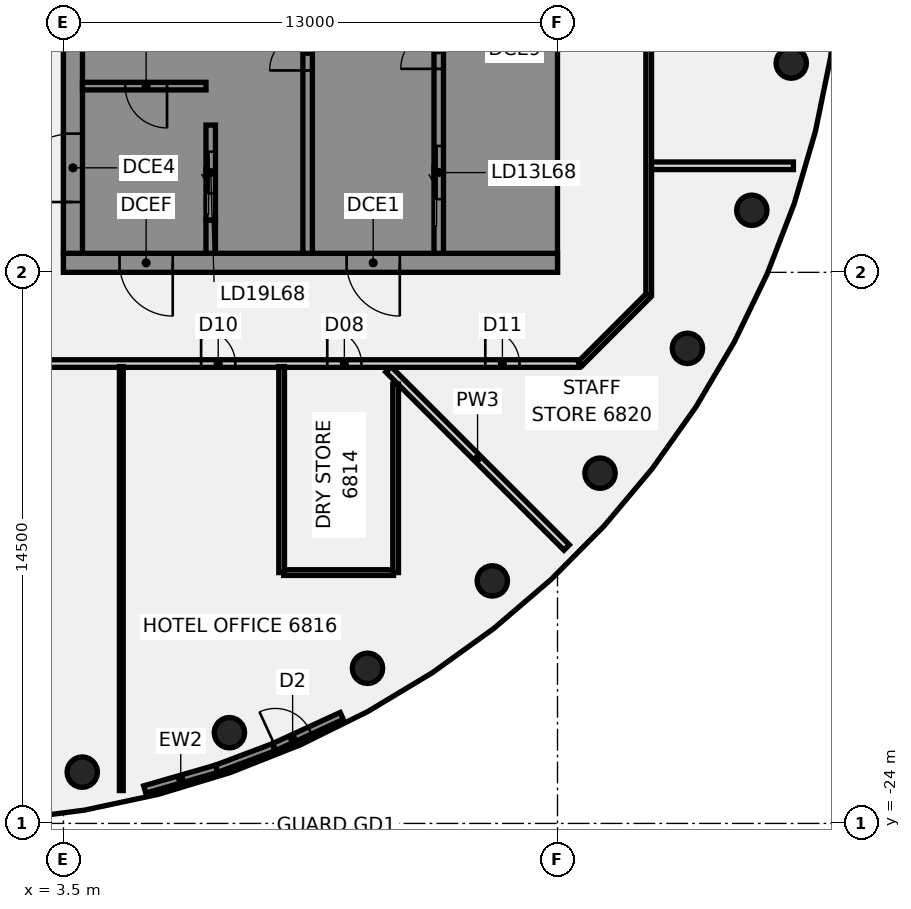
"""IFC4 building model, lengths in metres.
Left out: names, types, materials, properties, quantities, classifications, styles, units other than length and angle.
Written with IfcOpenShell. Run it as: python <this file> out.ifc"""

import sys

from ifc_helpers import new_model, si_unit, direction, frame, frame_2d, origin, origin_2d, place, context, subcontext, project, spatial, polyline, rectangle, circle, outline, extrude, element, fill, save


model = new_model("IFC4")
c1 = context("Model", 3, precision=1e-05, world=origin(), true_north=direction((0.0, 1.0)))
c2 = subcontext(c1, "Body", "Model", "MODEL_VIEW")
j1 = project(units=[si_unit("LENGTHUNIT", "METRE"), si_unit("PLANEANGLEUNIT", "RADIAN")], contexts=[c1])
p1 = place(None, origin())
s1 = spatial("IfcSite", under=j1, at=p1, CompositionType="ELEMENT")
p2 = place(p1, origin())
s2 = spatial("IfcBuilding", under=s1, at=p2, CompositionType="ELEMENT")
p3 = place(p2, frame((0.0, 0.0, 267.6)))
s3 = spatial("IfcBuildingStorey", under=s2, at=p3, CompositionType="ELEMENT", Elevation=267.6)
for number, where, z_axis, x_axis in (
    (1, (3.994, -22.651, -0.14), (0.0, 0.0, 1.0), (1.0, 0.0, 0.0)),
    (2, (7.866, -21.613, -0.14), (0.0, 0.0, 1.0), (1.0, 0.0, 0.0)),
    (3, (11.5, -19.919, -0.14), (0.0, 0.0, 1.0), (1.0, 0.0, 0.0)),
    (4, (14.784, -17.619, -0.14), (0.0, 0.0, 1.0), (1.0, 0.0, 0.0)),
    (5, (17.619, -14.784, -0.14), (0.0, 0.0, 1.0), (1.0, 0.0, 0.0)),
    (6, (19.919, -11.5, -0.14), (0.0, 0.0, 1.0), (1.0, 0.0, 0.0)),
    (7, (21.613, -7.866, -0.14), (0.0, 0.0, 1.0), (1.0, 0.0, 0.0)),
    (8, (22.651, -3.994, -0.14), (0.0, 0.0, 1.0), (1.0, 0.0, 0.0)),
):
    element("IfcColumn", number, at=place(p3, frame(where, z_axis=z_axis, x_axis=x_axis)), inside=s3, PredefinedType="COLUMN", context=c2, shape_type="SweptSolid", body=[
        extrude(circle(Radius=0.4, at=origin_2d()), origin(), (0.0, 0.0, 1.0), 3.6),
    ])
p4 = place(p3, frame((12.052, -12.052, 0.0), z_axis=(0.0, 0.0, 1.0), x_axis=(0.707106781187, -0.707106781187, 0.0)))
e9 = element("IfcWall", 9, at=p4, inside=s3, PredefinedType="PARTITIONING", context=c2, shape_type="SweptSolid", body=[
    extrude(rectangle(XDim=6.631, YDim=0.2, at=frame_2d((3.315, 0.0))), origin(), (0.0, 0.0, 1.0), 2.864),
])
p5 = place(p3, frame((-17.1, -11.9, 0.0), z_axis=(0.0, 0.0, 1.0), x_axis=(1.0, 0.0, 0.0)))
e10 = element("IfcWall", 10, at=p5, inside=s3, PredefinedType="PARTITIONING", context=c2, shape_type="SweptSolid", body=[
    extrude(rectangle(XDim=34.165, YDim=0.2, at=frame_2d((17.083, 0.0))), origin(), (0.0, 0.0, 1.0), 2.864),
])
p6 = place(p5, frame((7.75, 0.0, 0.0)))
e11 = element("IfcOpeningElement", 11, at=p6, cuts=e10, PredefinedType="OPENING", context=c2, shape_type="SweptSolid", body=[
    extrude(rectangle(XDim=0.9, YDim=2.1, at=frame_2d((0.45, 1.05))), frame((0.0, 0.11, 0.0), z_axis=(0.0, -1.0, 0.0), x_axis=(1.0, 0.0, 0.0)), (0.0, 0.0, 1.0), 0.22),
])
p7 = place(p5, frame((27.541, 0.0, 0.0)))
e12 = element("IfcOpeningElement", 12, at=p7, cuts=e10, PredefinedType="OPENING", context=c2, shape_type="SweptSolid", body=[
    extrude(rectangle(XDim=0.9, YDim=2.1, at=frame_2d((0.45, 1.05))), frame((0.0, 0.11, 0.0), z_axis=(0.0, -1.0, 0.0), x_axis=(1.0, 0.0, 0.0)), (0.0, 0.0, 1.0), 0.22),
])
p8 = place(p5, frame((16.809, 0.0, 0.0)))
e13 = element("IfcOpeningElement", 13, at=p8, cuts=e10, PredefinedType="OPENING", context=c2, shape_type="SweptSolid", body=[
    extrude(rectangle(XDim=1.8, YDim=2.1, at=frame_2d((0.9, 1.05))), frame((0.0, 0.11, 0.0), z_axis=(0.0, -1.0, 0.0), x_axis=(1.0, 0.0, 0.0)), (0.0, 0.0, 1.0), 0.22),
])
p9 = place(p5, frame((24.222, 0.0, 0.0)))
e14 = element("IfcOpeningElement", 14, at=p9, cuts=e10, PredefinedType="OPENING", context=c2, shape_type="SweptSolid", body=[
    extrude(rectangle(XDim=0.9, YDim=2.1, at=frame_2d((0.45, 1.05))), frame((0.0, 0.11, 0.0), z_axis=(0.0, -1.0, 0.0), x_axis=(1.0, 0.0, 0.0)), (0.0, 0.0, 1.0), 0.22),
])
p10 = place(p5, frame((31.7, 0.0, 0.0)))
e15 = element("IfcOpeningElement", 15, at=p10, cuts=e10, PredefinedType="OPENING", context=c2, shape_type="SweptSolid", body=[
    extrude(rectangle(XDim=0.9, YDim=2.1, at=frame_2d((0.45, 1.05))), frame((0.0, 0.11, 0.0), z_axis=(0.0, -1.0, 0.0), x_axis=(1.0, 0.0, 0.0)), (0.0, 0.0, 1.0), 0.22),
])
p11 = place(p3, frame((9.296, -17.4, 0.0), z_axis=(0.0, 0.0, 1.0), x_axis=(1.0, 0.0, 0.0)))
e16 = element("IfcWall", 16, at=p11, inside=s3, PredefinedType="PARTITIONING", context=c2, shape_type="SweptSolid", body=[
    extrude(rectangle(XDim=2.89, YDim=0.15, at=frame_2d((1.445, 0.0))), origin(), (0.0, 0.0, 1.0), 2.864),
])
p12 = place(p3, frame((18.955, -6.696, 0.0), z_axis=(0.0, 0.0, 1.0), x_axis=(1.0, 0.0, 0.0)))
e17 = element("IfcWall", 17, at=p12, inside=s3, PredefinedType="PARTITIONING", context=c2, shape_type="SweptSolid", body=[
    extrude(rectangle(XDim=3.753, YDim=0.2, at=frame_2d((1.876, 0.0))), origin(), (0.0, 0.0, 1.0), 2.864),
])
p13 = place(p3, frame((17.1, -11.9, 0.0), z_axis=(0.0, 0.0, 1.0), x_axis=(0.707106781187, 0.707106781187, 0.0)))
e18 = element("IfcWall", 18, at=p13, inside=s3, PredefinedType="PARTITIONING", context=c2, shape_type="SweptSolid", body=[
    extrude(rectangle(XDim=2.505, YDim=0.15, at=frame_2d((1.253, 0.0))), origin(), (0.0, 0.0, 1.0), 2.864),
])
p14 = place(p3, frame((5.022, -23.136, 0.0), z_axis=(0.0, 0.0, 1.0), x_axis=(0.0, 1.0, 0.0)))
e19 = element("IfcWall", 19, at=p14, inside=s3, PredefinedType="PARTITIONING", context=c2, shape_type="SweptSolid", body=[
    extrude(rectangle(XDim=11.156, YDim=0.1, at=frame_2d((5.578, 0.0))), origin(), (0.0, 0.0, 1.0), 2.864),
])
p15 = place(p3, frame((9.241, -17.4, 0.0), z_axis=(0.0, 0.0, 1.0), x_axis=(0.0, 1.0, 0.0)))
e20 = element("IfcWall", 20, at=p15, inside=s3, PredefinedType="PARTITIONING", context=c2, shape_type="SweptSolid", body=[
    extrude(rectangle(XDim=5.42, YDim=0.15, at=frame_2d((2.71, 0.0))), origin(), (0.0, 0.0, 1.0), 2.864),
])
p16 = place(p3, frame((12.241, -17.4, 0.0), z_axis=(0.0, 0.0, 1.0), x_axis=(0.0, 1.0, 0.0)))
e21 = element("IfcWall", 21, at=p16, inside=s3, PredefinedType="PARTITIONING", context=c2, shape_type="SweptSolid", body=[
    extrude(rectangle(XDim=4.959, YDim=0.15, at=frame_2d((2.479, 0.0))), origin(), (0.0, 0.0, 1.0), 2.864),
])
p17 = place(p3, frame((18.9, -10.1, 0.0), z_axis=(0.0, 0.0, 1.0), x_axis=(0.0, 1.0, 0.0)))
e22 = element("IfcWall", 22, at=p17, inside=s3, PredefinedType="PARTITIONING", context=c2, shape_type="SweptSolid", body=[
    extrude(rectangle(XDim=20.2, YDim=0.15, at=frame_2d((10.1, 0.0))), origin(), (0.0, 0.0, 1.0), 2.864),
])
p18 = place(p17, frame((7.154, 0.0, 0.0)))
e23 = element("IfcOpeningElement", 23, at=p18, cuts=e22, PredefinedType="OPENING", context=c2, shape_type="SweptSolid", body=[
    extrude(rectangle(XDim=0.9, YDim=2.1, at=frame_2d((0.45, 1.05))), frame((0.0, 0.085, 0.0), z_axis=(0.0, -1.0, 0.0), x_axis=(1.0, 0.0, 0.0)), (0.0, 0.0, 1.0), 0.17),
])
p19 = place(p3, frame((5.638, -23.107, 0.0), z_axis=(0.0, 0.0, 1.0), x_axis=(0.960848925483, 0.277072810644, 0.0)))
e24 = element("IfcWall", 24, at=p19, inside=s3, PredefinedType="SOLIDWALL", context=c2, shape_type="SweptSolid", body=[
    extrude(rectangle(XDim=1.974, YDim=0.2, at=frame_2d((0.987, 0.0))), origin(), (0.0, 0.0, 1.0), 3.46),
])
p20 = place(p3, frame((9.031, -21.996, 0.0), z_axis=(0.0, 0.0, 1.0), x_axis=(0.90857405357, 0.417723819263, 0.0)))
e25 = element("IfcWall", 25, at=p20, inside=s3, PredefinedType="SOLIDWALL", context=c2, shape_type="SweptSolid", body=[
    extrude(rectangle(XDim=1.973, YDim=0.2, at=frame_2d((0.987, 0.0))), origin(), (0.0, 0.0, 1.0), 3.46),
])
p21 = place(p20, frame((0.05, 0.0, 0.0)))
e26 = element("IfcOpeningElement", 26, at=p21, cuts=e25, PredefinedType="OPENING", context=c2, shape_type="SweptSolid", body=[
    extrude(rectangle(XDim=1.0, YDim=2.4, at=frame_2d((0.5, 1.2))), frame((0.0, 0.11, 0.0), z_axis=(0.0, -1.0, 0.0), x_axis=(1.0, 0.0, 0.0)), (0.0, 0.0, 1.0), 0.22),
])
p22 = place(p3, frame((7.534, -22.56, 0.0), z_axis=(0.0, 0.0, 1.0), x_axis=(0.935643575704, 0.352946312127, 0.0)))
e27 = element("IfcWall", 27, at=p22, inside=s3, PredefinedType="SOLIDWALL", context=c2, shape_type="SweptSolid", body=[
    extrude(rectangle(XDim=1.599, YDim=0.2, at=frame_2d((0.8, 0.0))), origin(), (0.0, 0.0, 1.0), 3.46),
])
p23 = place(p3, frame((16.5, -9.25, 0.0), z_axis=(0.0, 0.0, 1.0), x_axis=(-1.0, 0.0, 0.0)))
e28 = element("IfcWall", 28, at=p23, inside=s3, PredefinedType="SHEAR", context=c2, shape_type="SweptSolid", body=[
    extrude(rectangle(XDim=13.0, YDim=0.5, at=frame_2d((6.5, 0.0))), origin(), (0.0, 0.0, 1.0), 3.46),
])
p24 = place(p23, frame((4.15, 0.0, 0.0)))
e29 = element("IfcOpeningElement", 29, at=p24, cuts=e28, PredefinedType="OPENING", context=c2, shape_type="SweptSolid", body=[
    extrude(rectangle(XDim=1.4, YDim=2.1, at=frame_2d((0.7, 1.05))), frame((0.0, 0.26, 0.0), z_axis=(0.0, -1.0, 0.0), x_axis=(1.0, 0.0, 0.0)), (0.0, 0.0, 1.0), 0.52),
])
p25 = place(p23, frame((10.125, 0.0, 0.0)))
e30 = element("IfcOpeningElement", 30, at=p25, cuts=e28, PredefinedType="OPENING", context=c2, shape_type="SweptSolid", body=[
    extrude(rectangle(XDim=1.4, YDim=2.1, at=frame_2d((0.7, 1.05))), frame((0.0, 0.26, 0.0), z_axis=(0.0, -1.0, 0.0), x_axis=(1.0, 0.0, 0.0)), (0.0, 0.0, 1.0), 0.52),
])
p26 = place(p3, origin())
e31 = element("IfcWall", 31, at=p26, inside=s3, PredefinedType="SHEAR", context=c2, shape_type="SweptSolid", body=[
    extrude(outline(polyline([(13.5, -8.125), (13.5, -9.0), (16.0, -9.0), (16.5, -9.0), (16.5, 9.0), (16.0, 9.0), (13.5, 9.0), (13.5, 8.125), (16.0, 8.125), (16.0, 5.625), (13.5, 5.625), (13.5, 5.375), (16.0, 5.375), (16.0, -5.375), (13.5, -5.375), (13.5, -5.625), (16.0, -5.625), (16.0, -8.125), (13.5, -8.125)])), origin(), (0.0, 0.0, 1.0), 3.46),
])
p27 = place(p3, origin())
e32 = element("IfcWall", 32, at=p27, inside=s3, PredefinedType="SHEAR", context=c2, shape_type="SweptSolid", body=[
    extrude(outline(polyline([(9.8, -5.375), (7.5, -5.375), (7.5, 2.625), (9.8, 2.625), (9.8, 2.875), (7.5, 2.875), (7.5, 5.375), (9.8, 5.375), (9.8, 5.625), (7.5, 5.625), (7.5, 8.125), (9.8, 8.125), (9.8, 9.0), (7.5, 9.0), (7.25, 9.0), (7.25, -5.625), (7.5, -5.625), (9.8, -5.625), (9.8, -5.375)])), origin(), (0.0, 0.0, 1.0), 3.46),
])
p28 = place(p3, origin())
e33 = element("IfcWall", 33, at=p28, inside=s3, PredefinedType="SHEAR", context=c2, shape_type="SweptSolid", body=[
    extrude(outline(polyline([(7.5, -8.125), (7.5, -9.0), (9.8, -9.0), (9.8, -8.125), (9.8, -5.625), (9.55, -5.625), (9.55, -8.125), (7.5, -8.125)])), origin(), (0.0, 0.0, 1.0), 3.46),
])
p29 = place(p3, frame((7.375, -9.0, 0.0), z_axis=(0.0, 0.0, 1.0), x_axis=(0.0, 1.0, 0.0)))
e34 = element("IfcWall", 34, at=p29, inside=s3, PredefinedType="SHEAR", context=c2, shape_type="SweptSolid", body=[
    extrude(rectangle(XDim=0.875, YDim=0.25, at=frame_2d((0.438, 0.0))), origin(), (0.0, 0.0, 1.0), 3.46),
])
p30 = place(p3, frame((13.375, -9.0, 0.0), z_axis=(0.0, 0.0, 1.0), x_axis=(0.0, 1.0, 0.0)))
e35 = element("IfcWall", 35, at=p30, inside=s3, PredefinedType="SHEAR", context=c2, shape_type="SweptSolid", body=[
    extrude(rectangle(XDim=18.0, YDim=0.25, at=frame_2d((9.0, 0.0))), origin(), (0.0, 0.0, 1.0), 3.46),
])
p31 = place(p30, frame((1.425, 0.0, 0.0)))
e36 = element("IfcOpeningElement", 36, at=p31, cuts=e35, PredefinedType="OPENING", context=c2, shape_type="SweptSolid", body=[
    extrude(rectangle(XDim=1.4, YDim=2.1, at=frame_2d((0.7, 1.05))), frame((0.0, 0.135, 0.0), z_axis=(0.0, -1.0, 0.0), x_axis=(1.0, 0.0, 0.0)), (0.0, 0.0, 1.0), 0.27),
])
p32 = place(p30, frame((4.854, 0.0, 0.0)))
e37 = element("IfcOpeningElement", 37, at=p32, cuts=e35, PredefinedType="OPENING", context=c2, shape_type="SweptSolid", body=[
    extrude(rectangle(XDim=1.0, YDim=2.1, at=frame_2d((0.5, 1.05))), frame((0.0, 0.135, 0.0), z_axis=(0.0, -1.0, 0.0), x_axis=(1.0, 0.0, 0.0)), (0.0, 0.0, 1.0), 0.27),
])
p33 = place(p30, frame((10.354, 0.0, 0.0)))
e38 = element("IfcOpeningElement", 38, at=p33, cuts=e35, PredefinedType="OPENING", context=c2, shape_type="SweptSolid", body=[
    extrude(rectangle(XDim=1.0, YDim=2.1, at=frame_2d((0.5, 1.05))), frame((0.0, 0.135, 0.0), z_axis=(0.0, -1.0, 0.0), x_axis=(1.0, 0.0, 0.0)), (0.0, 0.0, 1.0), 0.27),
])
p34 = place(p3, frame((9.925, -9.0, 0.0), z_axis=(0.0, 0.0, 1.0), x_axis=(0.0, 1.0, 0.0)))
e39 = element("IfcWall", 39, at=p34, inside=s3, PredefinedType="SHEAR", context=c2, shape_type="SweptSolid", body=[
    extrude(rectangle(XDim=18.0, YDim=0.25, at=frame_2d((9.0, 0.0))), origin(), (0.0, 0.0, 1.0), 3.46),
])
p35 = place(p34, frame((12.575, 0.0, 0.0)))
e40 = element("IfcOpeningElement", 40, at=p35, cuts=e39, PredefinedType="OPENING", context=c2, shape_type="SweptSolid", body=[
    extrude(rectangle(XDim=1.1, YDim=2.1, at=frame_2d((0.55, 1.05))), frame((0.0, 0.135, 0.0), z_axis=(0.0, -1.0, 0.0), x_axis=(1.0, 0.0, 0.0)), (0.0, 0.0, 1.0), 0.27),
])
p36 = place(p34, frame((15.325, 0.0, 0.0)))
e41 = element("IfcOpeningElement", 41, at=p36, cuts=e39, PredefinedType="OPENING", context=c2, shape_type="SweptSolid", body=[
    extrude(rectangle(XDim=1.1, YDim=2.1, at=frame_2d((0.55, 1.05))), frame((0.0, 0.135, 0.0), z_axis=(0.0, -1.0, 0.0), x_axis=(1.0, 0.0, 0.0)), (0.0, 0.0, 1.0), 0.27),
])
p37 = place(p34, frame((4.812, 0.0, 0.0)))
e42 = element("IfcOpeningElement", 42, at=p37, cuts=e39, PredefinedType="OPENING", context=c2, shape_type="SweptSolid", body=[
    extrude(rectangle(XDim=1.0, YDim=2.1, at=frame_2d((0.5, 1.05))), frame((0.0, 0.135, 0.0), z_axis=(0.0, -1.0, 0.0), x_axis=(1.0, 0.0, 0.0)), (0.0, 0.0, 1.0), 0.27),
])
p38 = place(p34, frame((7.562, 0.0, 0.0)))
e43 = element("IfcOpeningElement", 43, at=p38, cuts=e39, PredefinedType="OPENING", context=c2, shape_type="SweptSolid", body=[
    extrude(rectangle(XDim=1.0, YDim=2.1, at=frame_2d((0.5, 1.05))), frame((0.0, 0.135, 0.0), z_axis=(0.0, -1.0, 0.0), x_axis=(1.0, 0.0, 0.0)), (0.0, 0.0, 1.0), 0.27),
])
p39 = place(p34, frame((9.875, 0.0, 0.0)))
e44 = element("IfcOpeningElement", 44, at=p39, cuts=e39, PredefinedType="OPENING", context=c2, shape_type="SweptSolid", body=[
    extrude(rectangle(XDim=1.0, YDim=2.1, at=frame_2d((0.5, 1.05))), frame((0.0, 0.135, 0.0), z_axis=(0.0, -1.0, 0.0), x_axis=(1.0, 0.0, 0.0)), (0.0, 0.0, 1.0), 0.27),
])
p40 = place(p3, frame((7.375, -8.125, 0.0), z_axis=(0.0, 0.0, 1.0), x_axis=(0.0, 1.0, 0.0)))
e45 = element("IfcWall", 45, at=p40, inside=s3, PredefinedType="SHEAR", context=c2, shape_type="SweptSolid", body=[
    extrude(rectangle(XDim=2.5, YDim=0.25, at=frame_2d((1.25, 0.0))), origin(), (0.0, 0.0, 1.0), 3.46),
])
p41 = place(p40, frame((0.7, 0.0, 0.0)))
e46 = element("IfcOpeningElement", 46, at=p41, cuts=e45, PredefinedType="OPENING", context=c2, shape_type="SweptSolid", body=[
    extrude(rectangle(XDim=1.1, YDim=2.1, at=frame_2d((0.55, 1.05))), frame((0.0, 0.135, 0.0), z_axis=(0.0, -1.0, 0.0), x_axis=(1.0, 0.0, 0.0)), (0.0, 0.0, 1.0), 0.27),
])
p42 = place(p3, frame((3.75, -9.0, 0.0), z_axis=(0.0, 0.0, 1.0), x_axis=(0.0, 1.0, 0.0)))
e47 = element("IfcWall", 47, at=p42, inside=s3, PredefinedType="SHEAR", context=c2, shape_type="SweptSolid", body=[
    extrude(rectangle(XDim=18.0, YDim=0.5, at=frame_2d((9.0, 0.0))), origin(), (0.0, 0.0, 1.0), 3.46),
])
p43 = place(p42, frame((1.35, 0.0, 0.0)))
e48 = element("IfcOpeningElement", 48, at=p43, cuts=e47, PredefinedType="OPENING", context=c2, shape_type="SweptSolid", body=[
    extrude(rectangle(XDim=1.8, YDim=2.1, at=frame_2d((0.9, 1.05))), frame((0.0, 0.26, 0.0), z_axis=(0.0, -1.0, 0.0), x_axis=(1.0, 0.0, 0.0)), (0.0, 0.0, 1.0), 0.52),
])
p44 = place(p42, frame((12.75, 0.0, 0.0)))
e49 = element("IfcOpeningElement", 49, at=p44, cuts=e47, PredefinedType="OPENING", context=c2, shape_type="SweptSolid", body=[
    extrude(rectangle(XDim=1.0, YDim=2.1, at=frame_2d((0.5, 1.05))), frame((0.0, 0.26, 0.0), z_axis=(0.0, -1.0, 0.0), x_axis=(1.0, 0.0, 0.0)), (0.0, 0.0, 1.0), 0.52),
])
p45 = place(p42, frame((16.274, 0.0, 0.0)))
e50 = element("IfcOpeningElement", 50, at=p45, cuts=e47, PredefinedType="OPENING", context=c2, shape_type="SweptSolid", body=[
    extrude(rectangle(XDim=1.0, YDim=2.1, at=frame_2d((0.5, 1.05))), frame((0.0, 0.26, 0.0), z_axis=(0.0, -1.0, 0.0), x_axis=(1.0, 0.0, 0.0)), (0.0, 0.0, 1.0), 0.52),
])
p46 = place(p3, frame((7.25, -4.6, 0.0), z_axis=(0.0, 0.0, 1.0), x_axis=(-1.0, 0.0, 0.0)))
e51 = element("IfcWall", 51, at=p46, inside=s3, PredefinedType="SHEAR", context=c2, shape_type="SweptSolid", body=[
    extrude(rectangle(XDim=3.25, YDim=0.2, at=frame_2d((1.625, 0.0))), origin(), (0.0, 0.0, 1.0), 3.46),
])
p47 = place(p46, frame((1.025, 0.0, 0.0)))
e52 = element("IfcOpeningElement", 52, at=p47, cuts=e51, PredefinedType="OPENING", context=c2, shape_type="SweptSolid", body=[
    extrude(rectangle(XDim=1.1, YDim=2.1, at=frame_2d((0.55, 1.05))), frame((0.0, 0.11, 0.0), z_axis=(0.0, -1.0, 0.0), x_axis=(1.0, 0.0, 0.0)), (0.0, 0.0, 1.0), 0.22),
])
p48 = place(p7, frame((0.9, 0.0, 0.0), z_axis=(0.0, 0.0, 1.0), x_axis=(-1.0, 0.0, 0.0)))
e53 = element("IfcDoor", 53, at=p48, inside=s3, OperationType="SINGLE_SWING_RIGHT", PredefinedType="DOOR", context=c2, shape_type="SweptSolid", body=[
    extrude(rectangle(XDim=0.9, YDim=2.1, at=frame_2d((0.45, 1.05))), frame((0.0, 0.025, 0.0), z_axis=(0.0, -1.0, 0.0), x_axis=(1.0, 0.0, 0.0)), (0.0, 0.0, 1.0), 0.05),
])
fill(e12, e53)
p49 = place(p9, frame((0.9, 0.0, 0.0), z_axis=(0.0, 0.0, 1.0), x_axis=(-1.0, 0.0, 0.0)))
e54 = element("IfcDoor", 54, at=p49, inside=s3, OperationType="SINGLE_SWING_RIGHT", PredefinedType="DOOR", context=c2, shape_type="SweptSolid", body=[
    extrude(rectangle(XDim=0.9, YDim=2.1, at=frame_2d((0.45, 1.05))), frame((0.0, 0.025, 0.0), z_axis=(0.0, -1.0, 0.0), x_axis=(1.0, 0.0, 0.0)), (0.0, 0.0, 1.0), 0.05),
])
fill(e14, e54)
p50 = place(p10, frame((0.9, 0.0, 0.0), z_axis=(0.0, 0.0, 1.0), x_axis=(-1.0, 0.0, 0.0)))
e55 = element("IfcDoor", 55, at=p50, inside=s3, OperationType="SINGLE_SWING_RIGHT", PredefinedType="DOOR", context=c2, shape_type="SweptSolid", body=[
    extrude(rectangle(XDim=0.9, YDim=2.1, at=frame_2d((0.45, 1.05))), frame((0.0, 0.025, 0.0), z_axis=(0.0, -1.0, 0.0), x_axis=(1.0, 0.0, 0.0)), (0.0, 0.0, 1.0), 0.05),
])
fill(e15, e55)
p51 = place(p21, origin())
e56 = element("IfcDoor", 56, at=p51, inside=s3, OperationType="SINGLE_SWING_LEFT", PredefinedType="DOOR", context=c2, shape_type="SweptSolid", body=[
    extrude(rectangle(XDim=1.0, YDim=2.4, at=frame_2d((0.5, 1.2))), frame((0.0, 0.025, 0.0), z_axis=(0.0, -1.0, 0.0), x_axis=(1.0, 0.0, 0.0)), (0.0, 0.0, 1.0), 0.05),
])
fill(e26, e56)
p52 = place(p24, origin())
e57 = element("IfcDoor", 57, at=p52, inside=s3, OperationType="SINGLE_SWING_LEFT", PredefinedType="DOOR", context=c2, shape_type="SweptSolid", body=[
    extrude(rectangle(XDim=1.4, YDim=2.1, at=frame_2d((0.7, 1.05))), frame((0.0, 0.025, 0.0), z_axis=(0.0, -1.0, 0.0), x_axis=(1.0, 0.0, 0.0)), (0.0, 0.0, 1.0), 0.05),
])
fill(e29, e57)
p53 = place(p25, origin())
e58 = element("IfcDoor", 58, at=p53, inside=s3, OperationType="SINGLE_SWING_LEFT", PredefinedType="DOOR", context=c2, shape_type="SweptSolid", body=[
    extrude(rectangle(XDim=1.4, YDim=2.1, at=frame_2d((0.7, 1.05))), frame((0.0, 0.025, 0.0), z_axis=(0.0, -1.0, 0.0), x_axis=(1.0, 0.0, 0.0)), (0.0, 0.0, 1.0), 0.05),
])
fill(e30, e58)
p54 = place(p43, origin())
e59 = element("IfcDoor", 59, at=p54, inside=s3, OperationType="SINGLE_SWING_LEFT", PredefinedType="DOOR", context=c2, shape_type="SweptSolid", body=[
    extrude(rectangle(XDim=1.8, YDim=2.1, at=frame_2d((0.9, 1.05))), frame((0.0, 0.025, 0.0), z_axis=(0.0, -1.0, 0.0), x_axis=(1.0, 0.0, 0.0)), (0.0, 0.0, 1.0), 0.05),
])
fill(e48, e59)
p55 = place(p47, origin())
e60 = element("IfcDoor", 60, at=p55, inside=s3, OperationType="SINGLE_SWING_LEFT", PredefinedType="DOOR", context=c2, shape_type="SweptSolid", body=[
    extrude(rectangle(XDim=1.1, YDim=2.1, at=frame_2d((0.55, 1.05))), frame((0.0, 0.025, 0.0), z_axis=(0.0, -1.0, 0.0), x_axis=(1.0, 0.0, 0.0)), (0.0, 0.0, 1.0), 0.05),
])
fill(e52, e60)
p56 = place(p31, origin())
e61 = element("IfcDoor", 61, at=p56, inside=s3, OperationType="SLIDING_TO_LEFT", PredefinedType="DOOR", context=c2, shape_type="SweptSolid", body=[
    extrude(rectangle(XDim=1.4, YDim=2.1, at=frame_2d((0.7, 1.05))), frame((0.0, 0.025, 0.0), z_axis=(0.0, -1.0, 0.0), x_axis=(1.0, 0.0, 0.0)), (0.0, 0.0, 1.0), 0.05),
])
fill(e36, e61)
p57 = place(p41, origin())
e62 = element("IfcDoor", 62, at=p57, inside=s3, OperationType="SLIDING_TO_LEFT", PredefinedType="DOOR", context=c2, shape_type="SweptSolid", body=[
    extrude(rectangle(XDim=1.1, YDim=2.1, at=frame_2d((0.55, 1.05))), frame((0.0, 0.025, 0.0), z_axis=(0.0, -1.0, 0.0), x_axis=(1.0, 0.0, 0.0)), (0.0, 0.0, 1.0), 0.05),
])
fill(e46, e62)
p58 = place(p32, origin())
e63 = element("IfcDoor", 63, at=p58, inside=s3, OperationType="SINGLE_SWING_LEFT", PredefinedType="DOOR", context=c2, shape_type="SweptSolid", body=[
    extrude(rectangle(XDim=1.0, YDim=2.1, at=frame_2d((0.5, 1.05))), frame((0.0, 0.025, 0.0), z_axis=(0.0, -1.0, 0.0), x_axis=(1.0, 0.0, 0.0)), (0.0, 0.0, 1.0), 0.05),
])
fill(e37, e63)
p59 = place(p37, origin())
e64 = element("IfcDoor", 64, at=p59, inside=s3, OperationType="SINGLE_SWING_LEFT", PredefinedType="DOOR", context=c2, shape_type="SweptSolid", body=[
    extrude(rectangle(XDim=1.0, YDim=2.1, at=frame_2d((0.5, 1.05))), frame((0.0, 0.025, 0.0), z_axis=(0.0, -1.0, 0.0), x_axis=(1.0, 0.0, 0.0)), (0.0, 0.0, 1.0), 0.05),
])
fill(e42, e64)
save(model, sys.argv[1])
